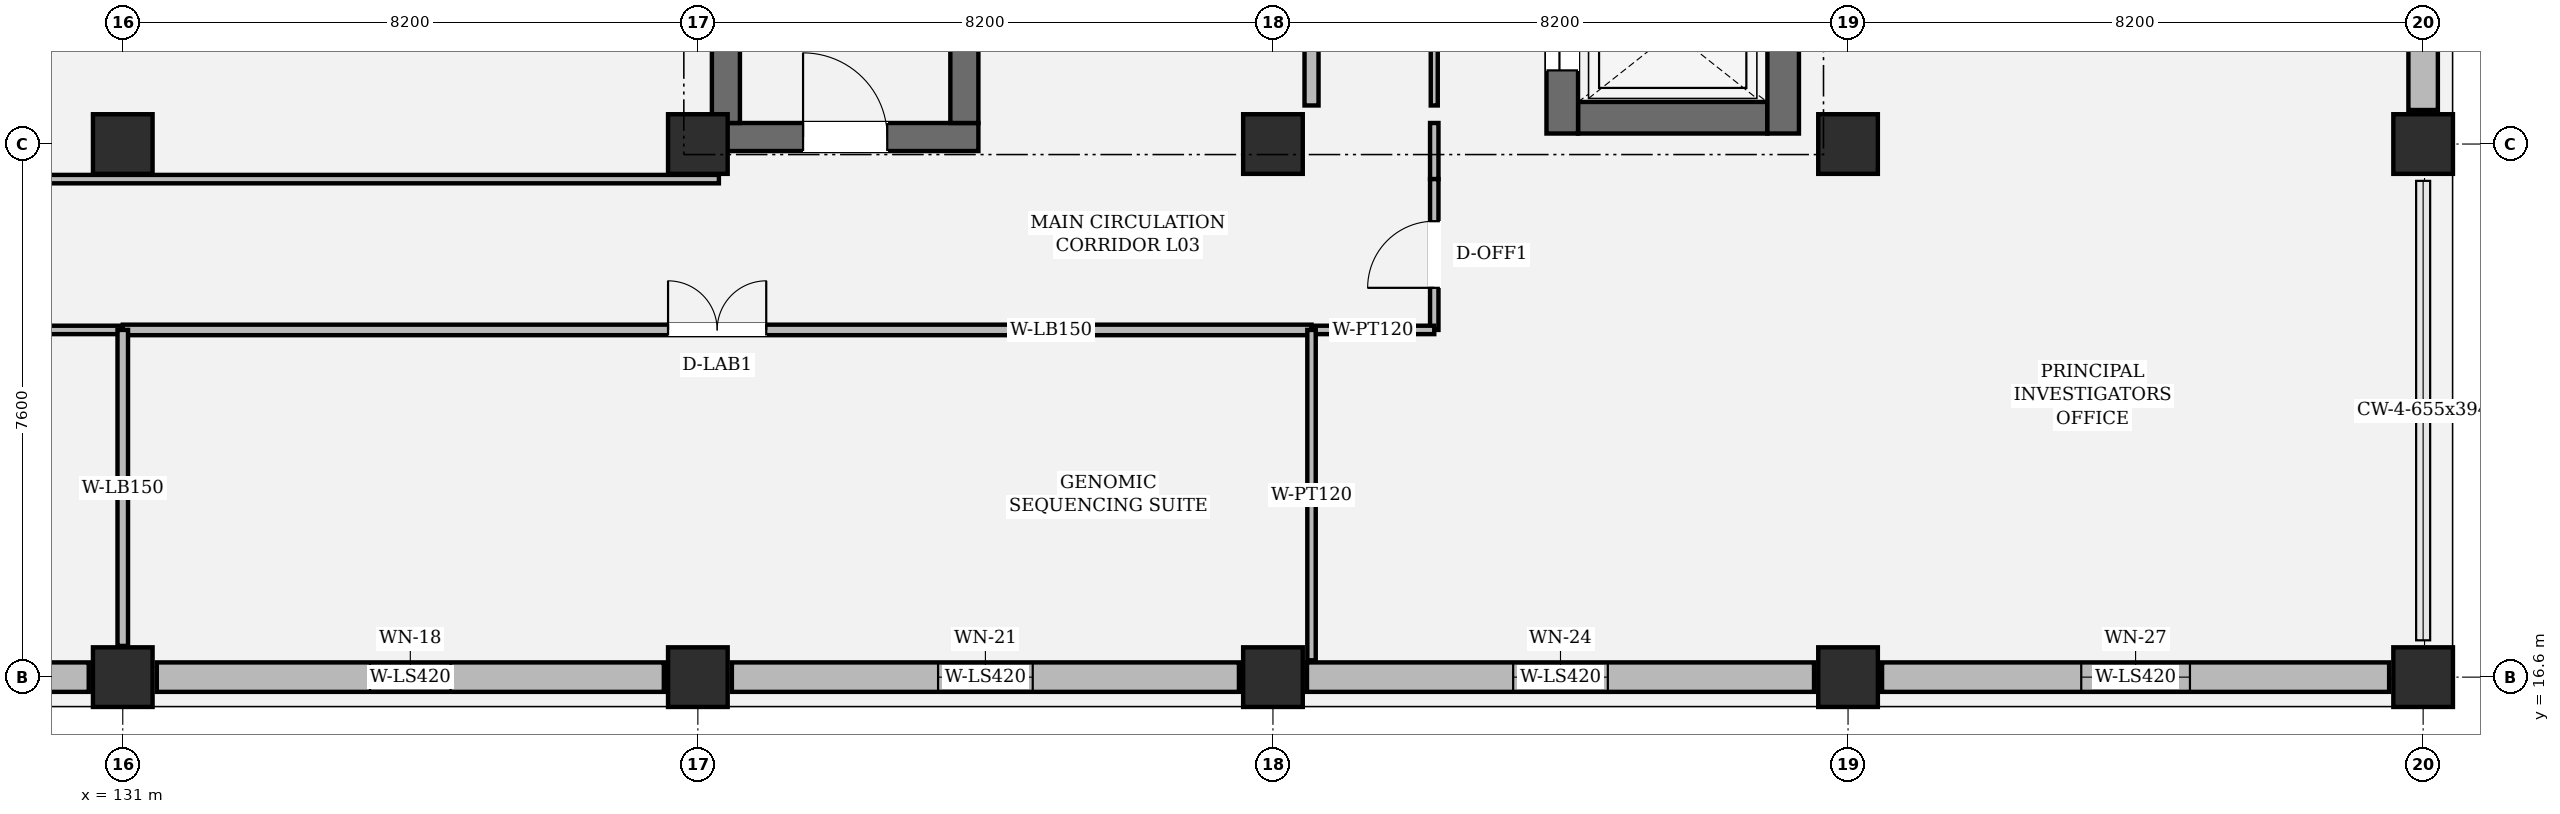
"""IFC4 building model, lengths in metres.
Left out: names, types, materials, properties, quantities, classifications, styles, units other than length and angle.
Written with IfcOpenShell. Run it as: python <this file> out.ifc"""

import sys

from ifc_helpers import new_model, si_unit, direction, frame, frame_2d, origin, origin_2d, place, context, subcontext, project, spatial, rectangle, extrude, element, fill, save


model = new_model("IFC4")
c1 = context("Model", 3, precision=1e-05, world=origin(), true_north=direction((0.0, 1.0)))
c2 = subcontext(c1, "Body", "Model", "MODEL_VIEW")
j1 = project(units=[si_unit("LENGTHUNIT", "METRE"), si_unit("PLANEANGLEUNIT", "RADIAN")], contexts=[c1])
p1 = place(None, origin())
s1 = spatial("IfcSite", under=j1, at=p1, CompositionType="ELEMENT")
p2 = place(p1, origin())
s2 = spatial("IfcBuilding", under=s1, at=p2, CompositionType="ELEMENT")
p3 = place(p2, frame((0.0, 0.0, 15.0)))
s3 = spatial("IfcBuildingStorey", under=s2, at=p3, CompositionType="ELEMENT", Elevation=15.0)
p4 = place(p3, frame((131.0, 16.6, 0.0), z_axis=(0.0, 0.0, 1.0), x_axis=(1.0, 0.0, 0.0)))
e1 = element("IfcColumn", 1, at=p4, inside=s3, PredefinedType="COLUMN", context=c2, shape_type="SweptSolid", body=[
    extrude(rectangle(XDim=0.85, YDim=0.85, at=origin_2d()), origin(), (0.0, 0.0, 1.0), 4.545),
])
p5 = place(p3, frame((131.0, 24.2, 0.0), z_axis=(0.0, 0.0, 1.0), x_axis=(1.0, 0.0, 0.0)))
e2 = element("IfcColumn", 2, at=p5, inside=s3, PredefinedType="COLUMN", context=c2, shape_type="SweptSolid", body=[
    extrude(rectangle(XDim=0.85, YDim=0.85, at=origin_2d()), origin(), (0.0, 0.0, 1.0), 4.48),
])
p6 = place(p3, frame((139.2, 16.6, 0.0), z_axis=(0.0, 0.0, 1.0), x_axis=(1.0, 0.0, 0.0)))
e3 = element("IfcColumn", 3, at=p6, inside=s3, PredefinedType="COLUMN", context=c2, shape_type="SweptSolid", body=[
    extrude(rectangle(XDim=0.85, YDim=0.85, at=origin_2d()), origin(), (0.0, 0.0, 1.0), 4.545),
])
p7 = place(p3, frame((139.2, 24.2, 0.0), z_axis=(0.0, 0.0, 1.0), x_axis=(1.0, 0.0, 0.0)))
e4 = element("IfcColumn", 4, at=p7, inside=s3, PredefinedType="COLUMN", context=c2, shape_type="SweptSolid", body=[
    extrude(rectangle(XDim=0.85, YDim=0.85, at=origin_2d()), origin(), (0.0, 0.0, 1.0), 4.48),
])
p8 = place(p3, frame((147.4, 16.6, 0.0), z_axis=(0.0, 0.0, 1.0), x_axis=(1.0, 0.0, 0.0)))
e5 = element("IfcColumn", 5, at=p8, inside=s3, PredefinedType="COLUMN", context=c2, shape_type="SweptSolid", body=[
    extrude(rectangle(XDim=0.85, YDim=0.85, at=origin_2d()), origin(), (0.0, 0.0, 1.0), 4.545),
])
p9 = place(p3, frame((147.4, 24.2, 0.0), z_axis=(0.0, 0.0, 1.0), x_axis=(1.0, 0.0, 0.0)))
e6 = element("IfcColumn", 6, at=p9, inside=s3, PredefinedType="COLUMN", context=c2, shape_type="SweptSolid", body=[
    extrude(rectangle(XDim=0.85, YDim=0.85, at=origin_2d()), origin(), (0.0, 0.0, 1.0), 4.48),
])
p10 = place(p3, frame((155.6, 16.6, 0.0), z_axis=(0.0, 0.0, 1.0), x_axis=(1.0, 0.0, 0.0)))
e7 = element("IfcColumn", 7, at=p10, inside=s3, PredefinedType="COLUMN", context=c2, shape_type="SweptSolid", body=[
    extrude(rectangle(XDim=0.85, YDim=0.85, at=origin_2d()), origin(), (0.0, 0.0, 1.0), 4.545),
])
p11 = place(p3, frame((155.6, 24.2, 0.0), z_axis=(0.0, 0.0, 1.0), x_axis=(1.0, 0.0, 0.0)))
e8 = element("IfcColumn", 8, at=p11, inside=s3, PredefinedType="COLUMN", context=c2, shape_type="SweptSolid", body=[
    extrude(rectangle(XDim=0.85, YDim=0.85, at=origin_2d()), origin(), (0.0, 0.0, 1.0), 4.48),
])
for number, where, z_axis, x_axis in (
    (9, (163.8, 16.6, 0.0), (0.0, 0.0, 1.0), (1.0, 0.0, 0.0)),
    (10, (163.8, 24.2, 0.0), (0.0, 0.0, 1.0), (1.0, 0.0, 0.0)),
):
    element("IfcColumn", number, at=place(p3, frame(where, z_axis=z_axis, x_axis=x_axis)), inside=s3, PredefinedType="COLUMN", context=c2, shape_type="SweptSolid", body=[
        extrude(rectangle(XDim=0.85, YDim=0.85, at=origin_2d()), origin(), (0.0, 0.0, 1.0), 4.545),
    ])
p12 = place(p3, frame((123.285, 16.6, 0.0), z_axis=(0.0, 0.0, 1.0), x_axis=(1.0, 0.0, 0.0)))
e11 = element("IfcWall", 11, at=p12, inside=s3, PredefinedType="SOLIDWALL", context=c2, shape_type="SweptSolid", body=[
    extrude(rectangle(XDim=7.23, YDim=0.42, at=frame_2d((3.615, 0.0))), origin(), (0.0, 0.0, 1.0), 3.93),
])
p13 = place(p12, frame((3.14, 0.0, 0.95)))
e12 = element("IfcOpeningElement", 12, at=p13, cuts=e11, PredefinedType="OPENING", context=c2, shape_type="SweptSolid", body=[
    extrude(rectangle(XDim=0.95, YDim=1.75, at=frame_2d((0.475, 0.875))), frame((0.0, 0.222, 0.0), z_axis=(0.0, -1.0, 0.0), x_axis=(1.0, 0.0, 0.0)), (0.0, 0.0, 1.0), 0.444),
])
p14 = place(p3, frame((131.485, 16.6, 0.0), z_axis=(0.0, 0.0, 1.0), x_axis=(1.0, 0.0, 0.0)))
e13 = element("IfcWall", 13, at=p14, inside=s3, PredefinedType="SOLIDWALL", context=c2, shape_type="SweptSolid", body=[
    extrude(rectangle(XDim=7.23, YDim=0.42, at=frame_2d((3.615, 0.0))), origin(), (0.0, 0.0, 1.0), 3.93),
])
p15 = place(p14, frame((3.04, 0.0, 0.95)))
e14 = element("IfcOpeningElement", 14, at=p15, cuts=e13, PredefinedType="OPENING", context=c2, shape_type="SweptSolid", body=[
    extrude(rectangle(XDim=1.15, YDim=1.5, at=frame_2d((0.575, 0.75))), frame((0.0, 0.222, 0.0), z_axis=(0.0, -1.0, 0.0), x_axis=(1.0, 0.0, 0.0)), (0.0, 0.0, 1.0), 0.444),
])
p16 = place(p3, frame((139.685, 16.6, 0.0), z_axis=(0.0, 0.0, 1.0), x_axis=(1.0, 0.0, 0.0)))
e15 = element("IfcWall", 15, at=p16, inside=s3, PredefinedType="SOLIDWALL", context=c2, shape_type="SweptSolid", body=[
    extrude(rectangle(XDim=7.23, YDim=0.42, at=frame_2d((3.615, 0.0))), origin(), (0.0, 0.0, 1.0), 3.93),
])
p17 = place(p16, frame((2.94, 0.0, 0.95)))
e16 = element("IfcOpeningElement", 16, at=p17, cuts=e15, PredefinedType="OPENING", context=c2, shape_type="SweptSolid", body=[
    extrude(rectangle(XDim=1.35, YDim=1.25, at=frame_2d((0.675, 0.625))), frame((0.0, 0.222, 0.0), z_axis=(0.0, -1.0, 0.0), x_axis=(1.0, 0.0, 0.0)), (0.0, 0.0, 1.0), 0.444),
])
p18 = place(p3, frame((147.885, 16.6, 0.0), z_axis=(0.0, 0.0, 1.0), x_axis=(1.0, 0.0, 0.0)))
e17 = element("IfcWall", 17, at=p18, inside=s3, PredefinedType="SOLIDWALL", context=c2, shape_type="SweptSolid", body=[
    extrude(rectangle(XDim=7.23, YDim=0.42, at=frame_2d((3.615, 0.0))), origin(), (0.0, 0.0, 1.0), 3.93),
])
p19 = place(p18, frame((2.94, 0.0, 0.95)))
e18 = element("IfcOpeningElement", 18, at=p19, cuts=e17, PredefinedType="OPENING", context=c2, shape_type="SweptSolid", body=[
    extrude(rectangle(XDim=1.35, YDim=2.05, at=frame_2d((0.675, 1.025))), frame((0.0, 0.222, 0.0), z_axis=(0.0, -1.0, 0.0), x_axis=(1.0, 0.0, 0.0)), (0.0, 0.0, 1.0), 0.444),
])
p20 = place(p3, frame((156.085, 16.6, 0.0), z_axis=(0.0, 0.0, 1.0), x_axis=(1.0, 0.0, 0.0)))
e19 = element("IfcWall", 19, at=p20, inside=s3, PredefinedType="SOLIDWALL", context=c2, shape_type="SweptSolid", body=[
    extrude(rectangle(XDim=7.23, YDim=0.42, at=frame_2d((3.615, 0.0))), origin(), (0.0, 0.0, 1.0), 3.93),
])
p21 = place(p20, frame((2.84, 0.0, 0.95)))
e20 = element("IfcOpeningElement", 20, at=p21, cuts=e19, PredefinedType="OPENING", context=c2, shape_type="SweptSolid", body=[
    extrude(rectangle(XDim=1.55, YDim=1.75, at=frame_2d((0.775, 0.875))), frame((0.0, 0.222, 0.0), z_axis=(0.0, -1.0, 0.0), x_axis=(1.0, 0.0, 0.0)), (0.0, 0.0, 1.0), 0.444),
])
p22 = place(p3, frame((163.8, 24.685, 0.0), z_axis=(0.0, 0.0, 1.0), x_axis=(0.0, 1.0, 0.0)))
e21 = element("IfcWall", 21, at=p22, inside=s3, PredefinedType="SOLIDWALL", context=c2, shape_type="SweptSolid", body=[
    extrude(rectangle(XDim=6.63, YDim=0.42, at=frame_2d((3.315, 0.0))), origin(), (0.0, 0.0, 1.0), 3.93),
])
p23 = place(p22, frame((2.84, 0.0, 0.95)))
e22 = element("IfcOpeningElement", 22, at=p23, cuts=e21, PredefinedType="OPENING", context=c2, shape_type="SweptSolid", body=[
    extrude(rectangle(XDim=0.95, YDim=2.05, at=frame_2d((0.475, 1.025))), frame((0.0, 0.222, 0.0), z_axis=(0.0, -1.0, 0.0), x_axis=(1.0, 0.0, 0.0)), (0.0, 0.0, 1.0), 0.444),
])
p24 = place(p3, frame((139.4, 24.3, 0.0), z_axis=(0.0, 0.0, 1.0), x_axis=(1.0, 0.0, 0.0)))
e23 = element("IfcWall", 23, at=p24, inside=s3, PredefinedType="SHEAR", context=c2, shape_type="SweptSolid", body=[
    extrude(rectangle(XDim=3.8, YDim=0.4, at=frame_2d((1.9, 0.0))), origin(), (0.0, 0.0, 1.0), 4.48),
])
p25 = place(p24, frame((1.3, 0.0, 0.0)))
e24 = element("IfcOpeningElement", 24, at=p25, cuts=e23, PredefinedType="OPENING", context=c2, shape_type="SweptSolid", body=[
    extrude(rectangle(XDim=1.2, YDim=2.2, at=frame_2d((0.6, 1.1))), frame((0.0, 0.212, 0.0), z_axis=(0.0, -1.0, 0.0), x_axis=(1.0, 0.0, 0.0)), (0.0, 0.0, 1.0), 0.424),
])
for number, where, z_axis, x_axis in (
    (25, (139.6, 24.5, 0.0), (0.0, 0.0, 1.0), (0.0, 1.0, 0.0)),
    (26, (143.0, 24.5, 0.0), (0.0, 0.0, 1.0), (0.0, 1.0, 0.0)),
):
    element("IfcWall", number, at=place(p3, frame(where, z_axis=z_axis, x_axis=x_axis)), inside=s3, PredefinedType="SHEAR", context=c2, shape_type="SweptSolid", body=[
        extrude(rectangle(XDim=7.0, YDim=0.4, at=frame_2d((3.5, 0.0))), origin(), (0.0, 0.0, 1.0), 4.48),
    ])
p26 = place(p3, frame((151.75, 24.575, 0.0), z_axis=(0.0, 0.0, 1.0), x_axis=(1.0, 0.0, 0.0)))
e27 = element("IfcWall", 27, at=p26, inside=s3, PredefinedType="SHEAR", context=c2, shape_type="SweptSolid", body=[
    extrude(rectangle(XDim=2.7, YDim=0.45, at=frame_2d((1.35, 0.0))), origin(), (0.0, 0.0, 1.0), 4.48),
])
p27 = place(p3, frame((151.525, 24.35, 0.0), z_axis=(0.0, 0.0, 1.0), x_axis=(0.0, 1.0, 0.0)))
e28 = element("IfcWall", 28, at=p27, inside=s3, PredefinedType="SHEAR", context=c2, shape_type="SweptSolid", body=[
    extrude(rectangle(XDim=2.9, YDim=0.45, at=frame_2d((1.45, 0.0))), origin(), (0.0, 0.0, 1.0), 4.48),
])
p28 = place(p27, frame((0.9, 0.0, 0.0)))
e29 = element("IfcOpeningElement", 29, at=p28, cuts=e28, PredefinedType="OPENING", context=c2, shape_type="SweptSolid", body=[
    extrude(rectangle(XDim=1.1, YDim=2.2, at=frame_2d((0.55, 1.1))), frame((0.0, 0.237, 0.0), z_axis=(0.0, -1.0, 0.0), x_axis=(1.0, 0.0, 0.0)), (0.0, 0.0, 1.0), 0.474),
])
p29 = place(p3, frame((154.675, 24.35, 0.0), z_axis=(0.0, 0.0, 1.0), x_axis=(0.0, 1.0, 0.0)))
e30 = element("IfcWall", 30, at=p29, inside=s3, PredefinedType="SHEAR", context=c2, shape_type="SweptSolid", body=[
    extrude(rectangle(XDim=2.9, YDim=0.45, at=frame_2d((1.45, 0.0))), origin(), (0.0, 0.0, 1.0), 4.48),
])
p30 = place(p3, frame((147.95, 31.75, 0.0), z_axis=(0.0, 0.0, 1.0), x_axis=(0.0, -1.0, 0.0)))
e31 = element("IfcWall", 31, at=p30, inside=s3, PredefinedType="PARTITIONING", context=c2, shape_type="SweptSolid", body=[
    extrude(rectangle(XDim=7.0, YDim=0.2, at=frame_2d((3.5, 0.0))), origin(), (0.0, 0.0, 1.0), 4.405),
])
p31 = place(p30, frame((2.75, 0.0, 0.0)))
e32 = element("IfcOpeningElement", 32, at=p31, cuts=e31, PredefinedType="OPENING", context=c2, shape_type="SweptSolid", body=[
    extrude(rectangle(XDim=1.5, YDim=2.2, at=frame_2d((0.75, 1.1))), frame((0.0, 0.112, 0.0), z_axis=(0.0, -1.0, 0.0), x_axis=(1.0, 0.0, 0.0)), (0.0, 0.0, 1.0), 0.224),
])
p32 = place(p3, frame((149.7, 24.75, 0.0), z_axis=(0.0, 0.0, 1.0), x_axis=(0.0, 1.0, 0.0)))
e33 = element("IfcWall", 33, at=p32, inside=s3, PredefinedType="PARTITIONING", context=c2, shape_type="SweptSolid", body=[
    extrude(rectangle(XDim=11.3, YDim=0.1, at=frame_2d((5.65, 0.0))), origin(), (0.0, 0.0, 1.0), 4.405),
])
p33 = place(p32, frame((4.75, 0.0, 0.0)))
e34 = element("IfcOpeningElement", 34, at=p33, cuts=e33, PredefinedType="OPENING", context=c2, shape_type="SweptSolid", body=[
    extrude(rectangle(XDim=1.8, YDim=2.4, at=frame_2d((0.9, 1.2))), frame((0.0, 0.062, 0.0), z_axis=(0.0, -1.0, 0.0), x_axis=(1.0, 0.0, 0.0)), (0.0, 0.0, 1.0), 0.124),
])
p34 = place(p3, frame((131.0, 21.55, 0.0), z_axis=(0.0, 0.0, 1.0), x_axis=(-1.0, 0.0, 0.0)))
e35 = element("IfcWall", 35, at=p34, inside=s3, PredefinedType="PARTITIONING", context=c2, shape_type="SweptSolid", body=[
    extrude(rectangle(XDim=16.0, YDim=0.12, at=frame_2d((8.0, 0.0))), origin(), (0.0, 0.0, 1.0), 4.155),
])
p35 = place(p34, frame((7.475, 0.0, 0.0)))
e36 = element("IfcOpeningElement", 36, at=p35, cuts=e35, PredefinedType="OPENING", context=c2, shape_type="SweptSolid", body=[
    extrude(rectangle(XDim=1.05, YDim=2.2, at=frame_2d((0.525, 1.1))), frame((0.0, 0.072, 0.0), z_axis=(0.0, -1.0, 0.0), x_axis=(1.0, 0.0, 0.0)), (0.0, 0.0, 1.0), 0.144),
])
p36 = place(p3, frame((147.95, 21.55, 0.0), z_axis=(0.0, 0.0, 1.0), x_axis=(-1.0, 0.0, 0.0)))
e37 = element("IfcWall", 37, at=p36, inside=s3, PredefinedType="PARTITIONING", context=c2, shape_type="SweptSolid", body=[
    extrude(rectangle(XDim=16.95, YDim=0.15, at=frame_2d((8.475, 0.0))), origin(), (0.0, 0.0, 1.0), 4.055),
])
p37 = place(p36, frame((7.775, 0.0, 0.0)))
e38 = element("IfcOpeningElement", 38, at=p37, cuts=e37, PredefinedType="OPENING", context=c2, shape_type="SweptSolid", body=[
    extrude(rectangle(XDim=1.4, YDim=2.2, at=frame_2d((0.7, 1.1))), frame((0.0, 0.087, 0.0), z_axis=(0.0, -1.0, 0.0), x_axis=(1.0, 0.0, 0.0)), (0.0, 0.0, 1.0), 0.174),
])
p38 = place(p3, frame((115.0, 23.7, 0.0), z_axis=(0.0, 0.0, 1.0), x_axis=(1.0, 0.0, 0.0)))
e39 = element("IfcWall", 39, at=p38, inside=s3, PredefinedType="PARTITIONING", context=c2, shape_type="SweptSolid", body=[
    extrude(rectangle(XDim=24.5, YDim=0.12, at=frame_2d((12.25, 0.0))), origin(), (0.0, 0.0, 1.0), 4.405),
])
p39 = place(p38, frame((11.725, 0.0, 0.0)))
e40 = element("IfcOpeningElement", 40, at=p39, cuts=e39, PredefinedType="OPENING", context=c2, shape_type="SweptSolid", body=[
    extrude(rectangle(XDim=1.05, YDim=2.2, at=frame_2d((0.525, 1.1))), frame((0.0, 0.072, 0.0), z_axis=(0.0, -1.0, 0.0), x_axis=(1.0, 0.0, 0.0)), (0.0, 0.0, 1.0), 0.144),
])
p40 = place(p3, frame((149.7, 24.5, 0.0), z_axis=(0.0, 0.0, 1.0), x_axis=(0.0, -1.0, 0.0)))
e41 = element("IfcWall", 41, at=p40, inside=s3, PredefinedType="PARTITIONING", context=c2, shape_type="SweptSolid", body=[
    extrude(rectangle(XDim=0.8, YDim=0.12, at=frame_2d((0.4, 0.0))), origin(), (0.0, 0.0, 1.0), 4.405),
])
p41 = place(p3, frame((149.7, 23.7, 0.0), z_axis=(0.0, 0.0, 1.0), x_axis=(0.0, -1.0, 0.0)))
e42 = element("IfcWall", 42, at=p41, inside=s3, PredefinedType="PARTITIONING", context=c2, shape_type="SweptSolid", body=[
    extrude(rectangle(XDim=2.15, YDim=0.12, at=frame_2d((1.075, 0.0))), origin(), (0.0, 0.0, 1.0), 4.405),
])
p42 = place(p41, frame((0.6, 0.0, 0.0)))
e43 = element("IfcOpeningElement", 43, at=p42, cuts=e42, PredefinedType="OPENING", context=c2, shape_type="SweptSolid", body=[
    extrude(rectangle(XDim=0.95, YDim=2.2, at=frame_2d((0.475, 1.1))), frame((0.0, 0.072, 0.0), z_axis=(0.0, -1.0, 0.0), x_axis=(1.0, 0.0, 0.0)), (0.0, 0.0, 1.0), 0.144),
])
p43 = place(p3, frame((149.7, 21.55, 0.0), z_axis=(0.0, 0.0, 1.0), x_axis=(-1.0, 0.0, 0.0)))
e44 = element("IfcWall", 44, at=p43, inside=s3, PredefinedType="PARTITIONING", context=c2, shape_type="SweptSolid", body=[
    extrude(rectangle(XDim=1.75, YDim=0.12, at=frame_2d((0.875, 0.0))), origin(), (0.0, 0.0, 1.0), 4.055),
])
p44 = place(p3, frame((131.0, 21.55, 0.0), z_axis=(0.0, 0.0, 1.0), x_axis=(0.0, -1.0, 0.0)))
e45 = element("IfcWall", 45, at=p44, inside=s3, PredefinedType="PARTITIONING", context=c2, shape_type="SweptSolid", body=[
    extrude(rectangle(XDim=4.505, YDim=0.15, at=frame_2d((2.252, 0.0))), origin(), (0.0, 0.0, 1.0), 3.765),
])
p45 = place(p3, frame((147.95, 21.55, 0.0), z_axis=(0.0, 0.0, 1.0), x_axis=(0.0, -1.0, 0.0)))
e46 = element("IfcWall", 46, at=p45, inside=s3, PredefinedType="PARTITIONING", context=c2, shape_type="SweptSolid", body=[
    extrude(rectangle(XDim=4.71, YDim=0.12, at=frame_2d((2.355, 0.0))), origin(), (0.0, 0.0, 1.0), 4.405),
])
p46 = place(p15, origin())
e47 = element("IfcWindow", 47, at=p46, inside=s3, PartitioningType="SINGLE_PANEL", PredefinedType="WINDOW", context=c2, shape_type="SweptSolid", body=[
    extrude(rectangle(XDim=1.15, YDim=1.5, at=frame_2d((0.575, 0.75))), frame((0.0, 0.03, 0.0), z_axis=(0.0, -1.0, 0.0), x_axis=(1.0, 0.0, 0.0)), (0.0, 0.0, 1.0), 0.06),
])
fill(e14, e47)
p47 = place(p17, origin())
e48 = element("IfcWindow", 48, at=p47, inside=s3, PartitioningType="SINGLE_PANEL", PredefinedType="WINDOW", context=c2, shape_type="SweptSolid", body=[
    extrude(rectangle(XDim=1.35, YDim=1.25, at=frame_2d((0.675, 0.625))), frame((0.0, 0.03, 0.0), z_axis=(0.0, -1.0, 0.0), x_axis=(1.0, 0.0, 0.0)), (0.0, 0.0, 1.0), 0.06),
])
fill(e16, e48)
p48 = place(p19, origin())
e49 = element("IfcWindow", 49, at=p48, inside=s3, PartitioningType="SINGLE_PANEL", PredefinedType="WINDOW", context=c2, shape_type="SweptSolid", body=[
    extrude(rectangle(XDim=1.35, YDim=2.05, at=frame_2d((0.675, 1.025))), frame((0.0, 0.03, 0.0), z_axis=(0.0, -1.0, 0.0), x_axis=(1.0, 0.0, 0.0)), (0.0, 0.0, 1.0), 0.06),
])
fill(e18, e49)
p49 = place(p21, origin())
e50 = element("IfcWindow", 50, at=p49, inside=s3, PartitioningType="DOUBLE_PANEL_VERTICAL", PredefinedType="WINDOW", context=c2, shape_type="SweptSolid", body=[
    extrude(rectangle(XDim=1.55, YDim=1.75, at=frame_2d((0.775, 0.875))), frame((0.0, 0.03, 0.0), z_axis=(0.0, -1.0, 0.0), x_axis=(1.0, 0.0, 0.0)), (0.0, 0.0, 1.0), 0.06),
])
fill(e20, e50)
p50 = place(p25, origin())
e51 = element("IfcDoor", 51, at=p50, inside=s3, OperationType="SINGLE_SWING_LEFT", PredefinedType="DOOR", context=c2, shape_type="SweptSolid", body=[
    extrude(rectangle(XDim=1.2, YDim=2.2, at=frame_2d((0.6, 1.1))), frame((0.0, 0.025, 0.0), z_axis=(0.0, -1.0, 0.0), x_axis=(1.0, 0.0, 0.0)), (0.0, 0.0, 1.0), 0.05),
])
fill(e24, e51)
p51 = place(p28, origin())
e52 = element("IfcDoor", 52, at=p51, inside=s3, OperationType="DOUBLE_DOOR_SLIDING", PredefinedType="DOOR", context=c2, shape_type="SweptSolid", body=[
    extrude(rectangle(XDim=1.1, YDim=2.2, at=frame_2d((0.55, 1.1))), frame((0.0, 0.025, 0.0), z_axis=(0.0, -1.0, 0.0), x_axis=(1.0, 0.0, 0.0)), (0.0, 0.0, 1.0), 0.05),
])
fill(e29, e52)
p52 = place(p37, frame((1.4, 0.0, 0.0), z_axis=(0.0, 0.0, 1.0), x_axis=(-1.0, 0.0, 0.0)))
e53 = element("IfcDoor", 53, at=p52, inside=s3, OperationType="DOUBLE_DOOR_SINGLE_SWING", PredefinedType="DOOR", context=c2, shape_type="SweptSolid", body=[
    extrude(rectangle(XDim=1.4, YDim=2.2, at=frame_2d((0.7, 1.1))), frame((0.0, 0.025, 0.0), z_axis=(0.0, -1.0, 0.0), x_axis=(1.0, 0.0, 0.0)), (0.0, 0.0, 1.0), 0.05),
])
fill(e38, e53)
p53 = place(p42, frame((0.95, 0.0, 0.0), z_axis=(0.0, 0.0, 1.0), x_axis=(-1.0, 0.0, 0.0)))
e54 = element("IfcDoor", 54, at=p53, inside=s3, OperationType="SINGLE_SWING_LEFT", PredefinedType="DOOR", context=c2, shape_type="SweptSolid", body=[
    extrude(rectangle(XDim=0.95, YDim=2.2, at=frame_2d((0.475, 1.1))), frame((0.0, 0.025, 0.0), z_axis=(0.0, -1.0, 0.0), x_axis=(1.0, 0.0, 0.0)), (0.0, 0.0, 1.0), 0.05),
])
fill(e43, e54)
save(model, sys.argv[1])
